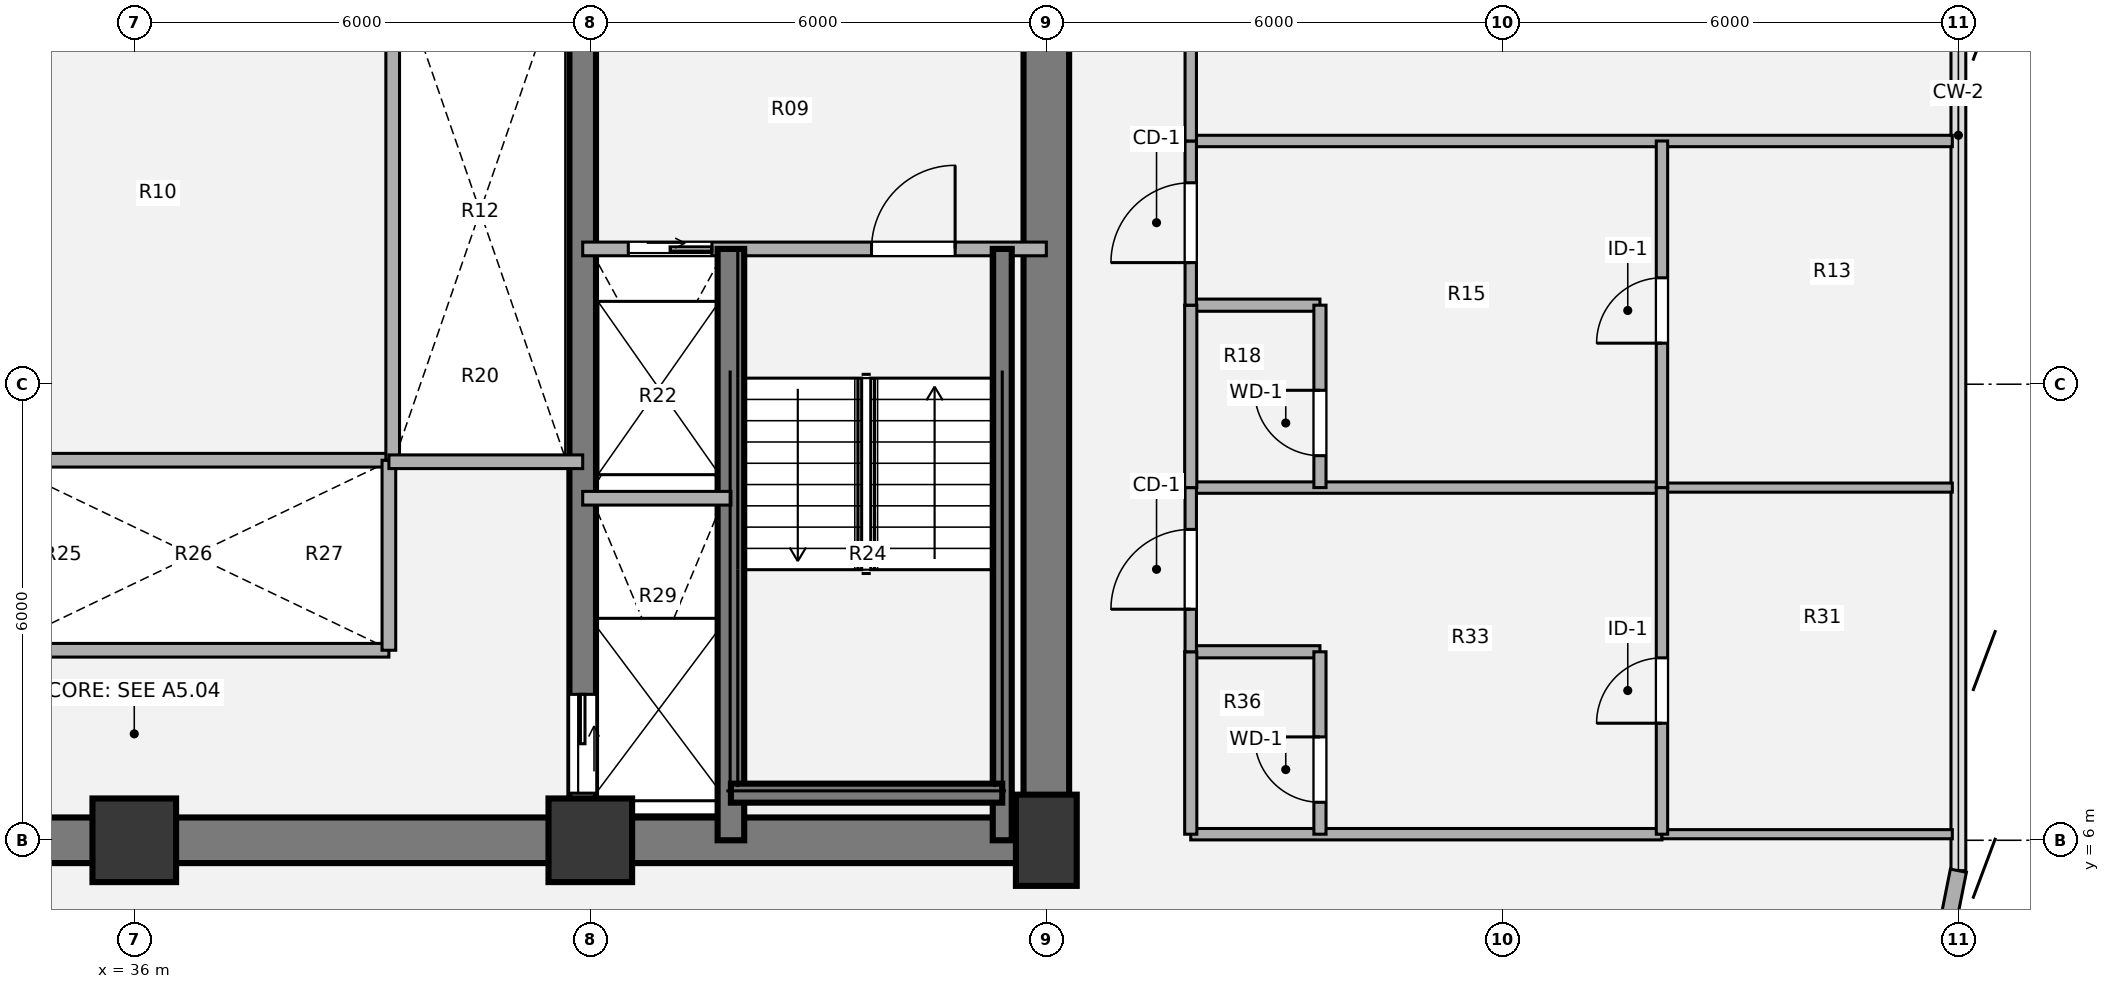
"""IFC4 building model, lengths in metres.
Left out: names, types, materials, properties, quantities, classifications, styles, units other than length and angle.
Written with IfcOpenShell. Run it as: python <this file> out.ifc"""

import sys

from ifc_helpers import new_model, si_unit, direction, frame, frame_2d, origin, origin_2d, place, context, subcontext, project, spatial, rectangle, extrude, source, transform, mapped, element, fill, save


model = new_model("IFC4")
c1 = context("Model", 3, precision=1e-05, world=origin(), true_north=direction((0.0, 1.0)))
c2 = subcontext(c1, "Body", "Model", "MODEL_VIEW")
j1 = project(units=[si_unit("LENGTHUNIT", "METRE"), si_unit("PLANEANGLEUNIT", "RADIAN")], contexts=[c1])
p1 = place(None, origin())
s1 = spatial("IfcSite", under=j1, at=p1, CompositionType="ELEMENT")
p2 = place(p1, origin())
s2 = spatial("IfcBuilding", under=s1, at=p2, CompositionType="ELEMENT")
p3 = place(p2, frame((0.0, 0.0, 49.68)))
s3 = spatial("IfcBuildingStorey", under=s2, at=p3, CompositionType="ELEMENT", Elevation=49.68)
m1 = source(origin(), c2, "Body", "SweptSolid", [
    extrude(rectangle(XDim=1.1, YDim=1.1, at=origin_2d()), origin(), (0.0, 0.0, 1.0), 3.78),
])
for number, where, z_axis, x_axis in (
    (1, (36.0, 6.0, 0.0), (0.0, 0.0, 1.0), (1.0, 0.0, 0.0)),
    (2, (42.0, 6.0, 0.0), (0.0, 0.0, 1.0), (1.0, 0.0, 0.0)),
):
    element("IfcColumn", number, at=place(p3, frame(where, z_axis=z_axis, x_axis=x_axis)), inside=s3, PredefinedType="COLUMN", context=c2, shape_type="MappedRepresentation", body=[
        mapped(m1, transform((0.0, 0.0, 0.0), x_axis=(1.0, 0.0, 0.0), y_axis=(0.0, 1.0, 0.0), z_axis=(0.0, 0.0, 1.0), scale=1.0)),
    ])
m2 = source(origin(), c2, "Body", "SweptSolid", [
    extrude(rectangle(XDim=0.8, YDim=1.2, at=origin_2d()), origin(), (0.0, 0.0, 1.0), 3.78),
])
p4 = place(p3, frame((48.0, 6.0, 0.0), z_axis=(0.0, 0.0, 1.0), x_axis=(1.0, 0.0, 0.0)))
e3 = element("IfcColumn", 3, at=p4, inside=s3, PredefinedType="COLUMN", context=c2, shape_type="MappedRepresentation", body=[
    mapped(m2, transform((0.0, 0.0, 0.0), x_axis=(1.0, 0.0, 0.0), y_axis=(0.0, 1.0, 0.0), z_axis=(0.0, 0.0, 1.0), scale=1.0)),
])
p5 = place(p3, frame((48.3, 6.0, 0.0), z_axis=(0.0, 0.0, 1.0), x_axis=(-1.0, 0.0, 0.0)))
e4 = element("IfcWall", 4, at=p5, inside=s3, PredefinedType="SHEAR", context=c2, shape_type="SweptSolid", body=[
    extrude(rectangle(XDim=24.6, YDim=0.6, at=frame_2d((12.3, 0.0))), origin(), (0.0, 0.0, 1.0), 3.78),
])
p6 = place(p3, frame((48.0, 18.0, 0.0), z_axis=(0.0, 0.0, 1.0), x_axis=(0.0, -1.0, 0.0)))
e5 = element("IfcWall", 5, at=p6, inside=s3, PredefinedType="SHEAR", context=c2, shape_type="SweptSolid", body=[
    extrude(rectangle(XDim=12.0, YDim=0.6, at=frame_2d((6.0, 0.0))), origin(), (0.0, 0.0, 1.0), 3.78),
])
p7 = place(p3, frame((41.9, 18.0, 0.0), z_axis=(0.0, 0.0, 1.0), x_axis=(0.0, -1.0, 0.0)))
e6 = element("IfcWall", 6, at=p7, inside=s3, PredefinedType="SHEAR", context=c2, shape_type="SweptSolid", body=[
    extrude(rectangle(XDim=12.0, YDim=0.35, at=frame_2d((6.0, 0.0))), origin(), (0.0, 0.0, 1.0), 3.78),
])
p8 = place(p7, frame((10.08, 0.0, 0.0)))
e7 = element("IfcOpeningElement", 7, at=p8, cuts=e6, PredefinedType="OPENING", context=c2, shape_type="SweptSolid", body=[
    extrude(rectangle(XDim=1.3, YDim=2.1, at=origin_2d()), frame((0.65, 0.185, 1.05), z_axis=(0.0, -1.0, 0.0), x_axis=(1.0, 0.0, 0.0)), (0.0, 0.0, 1.0), 0.37),
])
p9 = place(p3, frame((60.0, 5.6, 0.0), z_axis=(0.0, 0.0, 1.0), x_axis=(-0.195138390419, -0.980775717779, 0.0)))
e8 = element("IfcWall", 8, at=p9, inside=s3, PredefinedType="SOLIDWALL", context=c2, shape_type="SweptSolid", body=[
    extrude(rectangle(XDim=1.249, YDim=0.215, at=frame_2d((0.624, 0.0))), origin(), (0.0, 0.0, 1.0), 3.53),
])
for number, where, z_axis, x_axis in (
    (9, (34.2, 11.0, 0.0), (0.0, 0.0, 1.0), (1.0, 0.0, 0.0)),
    (10, (34.2, 8.5, 0.0), (0.0, 0.0, 1.0), (1.0, 0.0, 0.0)),
):
    element("IfcWall", number, at=place(p3, frame(where, z_axis=z_axis, x_axis=x_axis)), inside=s3, PredefinedType="PARTITIONING", context=c2, shape_type="SweptSolid", body=[
        extrude(rectangle(XDim=5.15, YDim=0.18, at=frame_2d((2.575, 0.0))), origin(), (0.0, 0.0, 1.0), 3.5),
    ])
p10 = place(p3, frame((39.35, 8.5, 0.0), z_axis=(0.0, 0.0, 1.0), x_axis=(0.0, 1.0, 0.0)))
e11 = element("IfcWall", 11, at=p10, inside=s3, PredefinedType="PARTITIONING", context=c2, shape_type="SweptSolid", body=[
    extrude(rectangle(XDim=2.5, YDim=0.18, at=frame_2d((1.25, 0.0))), origin(), (0.0, 0.0, 1.0), 3.5),
])
p11 = place(p3, frame((39.4, 11.0, 0.0), z_axis=(0.0, 0.0, 1.0), x_axis=(0.0, 1.0, 0.0)))
e12 = element("IfcWall", 12, at=p11, inside=s3, PredefinedType="PARTITIONING", context=c2, shape_type="SweptSolid", body=[
    extrude(rectangle(XDim=7.0, YDim=0.18, at=frame_2d((3.5, 0.0))), origin(), (0.0, 0.0, 1.0), 3.5),
])
p12 = place(p3, frame((39.35, 10.98, 0.0), z_axis=(0.0, 0.0, 1.0), x_axis=(1.0, 0.0, 0.0)))
e13 = element("IfcWall", 13, at=p12, inside=s3, PredefinedType="PARTITIONING", context=c2, shape_type="SweptSolid", body=[
    extrude(rectangle(XDim=2.55, YDim=0.18, at=frame_2d((1.275, 0.0))), origin(), (0.0, 0.0, 1.0), 3.5),
])
p13 = place(p3, frame((41.9, 13.78, 0.0), z_axis=(0.0, 0.0, 1.0), x_axis=(1.0, 0.0, 0.0)))
e14 = element("IfcWall", 14, at=p13, inside=s3, PredefinedType="PARTITIONING", context=c2, shape_type="SweptSolid", body=[
    extrude(rectangle(XDim=6.1, YDim=0.18, at=frame_2d((3.05, 0.0))), origin(), (0.0, 0.0, 1.0), 3.5),
])
p14 = place(p13, frame((0.6, 0.0, 0.0)))
e15 = element("IfcOpeningElement", 15, at=p14, cuts=e14, PredefinedType="OPENING", context=c2, shape_type="SweptSolid", body=[
    extrude(rectangle(XDim=1.1, YDim=2.1, at=origin_2d()), frame((0.55, 0.1, 1.05), z_axis=(0.0, -1.0, 0.0), x_axis=(1.0, 0.0, 0.0)), (0.0, 0.0, 1.0), 0.2),
])
p15 = place(p13, frame((3.8, 0.0, 0.0)))
e16 = element("IfcOpeningElement", 16, at=p15, cuts=e14, PredefinedType="OPENING", context=c2, shape_type="SweptSolid", body=[
    extrude(rectangle(XDim=1.1, YDim=2.1, at=origin_2d()), frame((0.55, 0.1, 1.05), z_axis=(0.0, -1.0, 0.0), x_axis=(1.0, 0.0, 0.0)), (0.0, 0.0, 1.0), 0.2),
])
p16 = place(p3, frame((43.85, 6.0, 0.0), z_axis=(0.0, 0.0, 1.0), x_axis=(0.0, 1.0, 0.0)))
e17 = element("IfcWall", 17, at=p16, inside=s3, PredefinedType="SHEAR", context=c2, shape_type="SweptSolid", body=[
    extrude(rectangle(XDim=7.78, YDim=0.35, at=frame_2d((3.89, 0.0))), origin(), (0.0, 0.0, 1.0), 3.85),
])
p17 = place(p3, frame((47.42, 6.0, 0.0), z_axis=(0.0, 0.0, 1.0), x_axis=(0.0, 1.0, 0.0)))
e18 = element("IfcWall", 18, at=p17, inside=s3, PredefinedType="SHEAR", context=c2, shape_type="SweptSolid", body=[
    extrude(rectangle(XDim=7.78, YDim=0.25, at=frame_2d((3.89, 0.0))), origin(), (0.0, 0.0, 1.0), 3.85),
])
p18 = place(p3, frame((43.85, 6.62, 0.0), z_axis=(0.0, 0.0, 1.0), x_axis=(1.0, 0.0, 0.0)))
e19 = element("IfcWall", 19, at=p18, inside=s3, PredefinedType="SHEAR", context=c2, shape_type="SweptSolid", body=[
    extrude(rectangle(XDim=3.57, YDim=0.25, at=frame_2d((1.785, 0.0))), origin(), (0.0, 0.0, 1.0), 3.85),
])
p19 = place(p3, frame((41.9, 10.5, 0.0), z_axis=(0.0, 0.0, 1.0), x_axis=(1.0, 0.0, 0.0)))
e20 = element("IfcWall", 20, at=p19, inside=s3, PredefinedType="PARTITIONING", context=c2, shape_type="SweptSolid", body=[
    extrude(rectangle(XDim=1.95, YDim=0.18, at=frame_2d((0.975, 0.0))), origin(), (0.0, 0.0, 1.0), 3.5),
])
p20 = place(p3, frame((49.9, 6.08, 0.0), z_axis=(0.0, 0.0, 1.0), x_axis=(1.0, 0.0, 0.0)))
e21 = element("IfcWall", 21, at=p20, inside=s3, PredefinedType="PARTITIONING", context=c2, shape_type="SweptSolid", body=[
    extrude(rectangle(XDim=6.2, YDim=0.15, at=frame_2d((3.1, 0.0))), origin(), (0.0, 0.0, 1.0), 3.5),
])
p21 = place(p3, frame((56.1, 6.08, 0.0), z_axis=(0.0, 0.0, 1.0), x_axis=(1.0, 0.0, 0.0)))
e22 = element("IfcWall", 22, at=p21, inside=s3, PredefinedType="PARTITIONING", context=c2, shape_type="SweptSolid", body=[
    extrude(rectangle(XDim=3.82, YDim=0.12, at=frame_2d((1.91, 0.0))), origin(), (0.0, 0.0, 1.0), 3.5),
])
p22 = place(p3, frame((49.9, 8.48, 0.0), z_axis=(0.0, 0.0, 1.0), x_axis=(1.0, 0.0, 0.0)))
e23 = element("IfcWall", 23, at=p22, inside=s3, PredefinedType="PLUMBINGWALL", context=c2, shape_type="SweptSolid", body=[
    extrude(rectangle(XDim=1.7, YDim=0.16, at=frame_2d((0.85, 0.0))), origin(), (0.0, 0.0, 1.0), 3.5),
])
p23 = place(p3, frame((49.9, 10.64, 0.0), z_axis=(0.0, 0.0, 1.0), x_axis=(1.0, 0.0, 0.0)))
e24 = element("IfcWall", 24, at=p23, inside=s3, PredefinedType="PARTITIONING", context=c2, shape_type="SweptSolid", body=[
    extrude(rectangle(XDim=6.2, YDim=0.15, at=frame_2d((3.1, 0.0))), origin(), (0.0, 0.0, 1.0), 3.5),
])
p24 = place(p3, frame((56.1, 10.64, 0.0), z_axis=(0.0, 0.0, 1.0), x_axis=(1.0, 0.0, 0.0)))
e25 = element("IfcWall", 25, at=p24, inside=s3, PredefinedType="PARTITIONING", context=c2, shape_type="SweptSolid", body=[
    extrude(rectangle(XDim=3.82, YDim=0.12, at=frame_2d((1.91, 0.0))), origin(), (0.0, 0.0, 1.0), 3.5),
])
p25 = place(p3, frame((49.9, 13.04, 0.0), z_axis=(0.0, 0.0, 1.0), x_axis=(1.0, 0.0, 0.0)))
e26 = element("IfcWall", 26, at=p25, inside=s3, PredefinedType="PLUMBINGWALL", context=c2, shape_type="SweptSolid", body=[
    extrude(rectangle(XDim=1.7, YDim=0.16, at=frame_2d((0.85, 0.0))), origin(), (0.0, 0.0, 1.0), 3.5),
])
p26 = place(p3, frame((49.9, 15.2, 0.0), z_axis=(0.0, 0.0, 1.0), x_axis=(1.0, 0.0, 0.0)))
e27 = element("IfcWall", 27, at=p26, inside=s3, PredefinedType="PARTITIONING", context=c2, shape_type="SweptSolid", body=[
    extrude(rectangle(XDim=10.02, YDim=0.15, at=frame_2d((5.01, 0.0))), origin(), (0.0, 0.0, 1.0), 3.5),
])
p27 = place(p3, frame((49.9, 6.08, 0.0), z_axis=(0.0, 0.0, 1.0), x_axis=(0.0, 1.0, 0.0)))
e28 = element("IfcWall", 28, at=p27, inside=s3, PredefinedType="PLUMBINGWALL", context=c2, shape_type="SweptSolid", body=[
    extrude(rectangle(XDim=2.4, YDim=0.16, at=frame_2d((1.2, 0.0))), origin(), (0.0, 0.0, 1.0), 3.5),
])
p28 = place(p3, frame((49.9, 8.48, 0.0), z_axis=(0.0, 0.0, 1.0), x_axis=(0.0, 1.0, 0.0)))
e29 = element("IfcWall", 29, at=p28, inside=s3, PredefinedType="PARTITIONING", context=c2, shape_type="SweptSolid", body=[
    extrude(rectangle(XDim=2.16, YDim=0.15, at=frame_2d((1.08, 0.0))), origin(), (0.0, 0.0, 1.0), 3.5),
])
p29 = place(p28, frame((0.56, 0.0, 0.0)))
e30 = element("IfcOpeningElement", 30, at=p29, cuts=e29, PredefinedType="OPENING", context=c2, shape_type="SweptSolid", body=[
    extrude(rectangle(XDim=1.05, YDim=2.1, at=origin_2d()), frame((0.525, 0.085, 1.05), z_axis=(0.0, -1.0, 0.0), x_axis=(1.0, 0.0, 0.0)), (0.0, 0.0, 1.0), 0.17),
])
p30 = place(p3, frame((49.9, 10.64, 0.0), z_axis=(0.0, 0.0, 1.0), x_axis=(0.0, 1.0, 0.0)))
e31 = element("IfcWall", 31, at=p30, inside=s3, PredefinedType="PLUMBINGWALL", context=c2, shape_type="SweptSolid", body=[
    extrude(rectangle(XDim=2.4, YDim=0.16, at=frame_2d((1.2, 0.0))), origin(), (0.0, 0.0, 1.0), 3.5),
])
p31 = place(p3, frame((49.9, 13.04, 0.0), z_axis=(0.0, 0.0, 1.0), x_axis=(0.0, 1.0, 0.0)))
e32 = element("IfcWall", 32, at=p31, inside=s3, PredefinedType="PARTITIONING", context=c2, shape_type="SweptSolid", body=[
    extrude(rectangle(XDim=2.16, YDim=0.15, at=frame_2d((1.08, 0.0))), origin(), (0.0, 0.0, 1.0), 3.5),
])
p32 = place(p31, frame((0.56, 0.0, 0.0)))
e33 = element("IfcOpeningElement", 33, at=p32, cuts=e32, PredefinedType="OPENING", context=c2, shape_type="SweptSolid", body=[
    extrude(rectangle(XDim=1.05, YDim=2.1, at=origin_2d()), frame((0.525, 0.085, 1.05), z_axis=(0.0, -1.0, 0.0), x_axis=(1.0, 0.0, 0.0)), (0.0, 0.0, 1.0), 0.17),
])
p33 = place(p3, frame((49.9, 15.2, 0.0), z_axis=(0.0, 0.0, 1.0), x_axis=(0.0, 1.0, 0.0)))
e34 = element("IfcWall", 34, at=p33, inside=s3, PredefinedType="PARTITIONING", context=c2, shape_type="SweptSolid", body=[
    extrude(rectangle(XDim=9.8, YDim=0.15, at=frame_2d((4.9, 0.0))), origin(), (0.0, 0.0, 1.0), 3.5),
])
p34 = place(p33, frame((4.375, 0.0, 0.0)))
e35 = element("IfcOpeningElement", 35, at=p34, cuts=e34, PredefinedType="OPENING", context=c2, shape_type="SweptSolid", body=[
    extrude(rectangle(XDim=1.05, YDim=2.1, at=origin_2d()), frame((0.525, 0.085, 1.05), z_axis=(0.0, -1.0, 0.0), x_axis=(1.0, 0.0, 0.0)), (0.0, 0.0, 1.0), 0.17),
])
p35 = place(p3, frame((51.6, 6.08, 0.0), z_axis=(0.0, 0.0, 1.0), x_axis=(0.0, 1.0, 0.0)))
e36 = element("IfcWall", 36, at=p35, inside=s3, PredefinedType="PLUMBINGWALL", context=c2, shape_type="SweptSolid", body=[
    extrude(rectangle(XDim=2.4, YDim=0.16, at=frame_2d((1.2, 0.0))), origin(), (0.0, 0.0, 1.0), 3.5),
])
p36 = place(p35, frame((0.42, 0.0, 0.0)))
e37 = element("IfcOpeningElement", 37, at=p36, cuts=e36, PredefinedType="OPENING", context=c2, shape_type="SweptSolid", body=[
    extrude(rectangle(XDim=0.86, YDim=2.1, at=origin_2d()), frame((0.43, 0.09, 1.05), z_axis=(0.0, -1.0, 0.0), x_axis=(1.0, 0.0, 0.0)), (0.0, 0.0, 1.0), 0.18),
])
p37 = place(p3, frame((51.6, 10.64, 0.0), z_axis=(0.0, 0.0, 1.0), x_axis=(0.0, 1.0, 0.0)))
e38 = element("IfcWall", 38, at=p37, inside=s3, PredefinedType="PLUMBINGWALL", context=c2, shape_type="SweptSolid", body=[
    extrude(rectangle(XDim=2.4, YDim=0.16, at=frame_2d((1.2, 0.0))), origin(), (0.0, 0.0, 1.0), 3.5),
])
p38 = place(p37, frame((0.42, 0.0, 0.0)))
e39 = element("IfcOpeningElement", 39, at=p38, cuts=e38, PredefinedType="OPENING", context=c2, shape_type="SweptSolid", body=[
    extrude(rectangle(XDim=0.86, YDim=2.1, at=origin_2d()), frame((0.43, 0.09, 1.05), z_axis=(0.0, -1.0, 0.0), x_axis=(1.0, 0.0, 0.0)), (0.0, 0.0, 1.0), 0.18),
])
p39 = place(p3, frame((56.1, 6.08, 0.0), z_axis=(0.0, 0.0, 1.0), x_axis=(0.0, 1.0, 0.0)))
e40 = element("IfcWall", 40, at=p39, inside=s3, PredefinedType="PARTITIONING", context=c2, shape_type="SweptSolid", body=[
    extrude(rectangle(XDim=4.56, YDim=0.15, at=frame_2d((2.28, 0.0))), origin(), (0.0, 0.0, 1.0), 3.5),
])
p40 = place(p39, frame((1.46, 0.0, 0.0)))
e41 = element("IfcOpeningElement", 41, at=p40, cuts=e40, PredefinedType="OPENING", context=c2, shape_type="SweptSolid", body=[
    extrude(rectangle(XDim=0.86, YDim=2.1, at=origin_2d()), frame((0.43, 0.085, 1.05), z_axis=(0.0, -1.0, 0.0), x_axis=(1.0, 0.0, 0.0)), (0.0, 0.0, 1.0), 0.17),
])
p41 = place(p3, frame((56.1, 10.64, 0.0), z_axis=(0.0, 0.0, 1.0), x_axis=(0.0, 1.0, 0.0)))
e42 = element("IfcWall", 42, at=p41, inside=s3, PredefinedType="PARTITIONING", context=c2, shape_type="SweptSolid", body=[
    extrude(rectangle(XDim=4.56, YDim=0.15, at=frame_2d((2.28, 0.0))), origin(), (0.0, 0.0, 1.0), 3.5),
])
p42 = place(p41, frame((1.9, 0.0, 0.0)))
e43 = element("IfcOpeningElement", 43, at=p42, cuts=e42, PredefinedType="OPENING", context=c2, shape_type="SweptSolid", body=[
    extrude(rectangle(XDim=0.86, YDim=2.1, at=origin_2d()), frame((0.43, 0.085, 1.05), z_axis=(0.0, -1.0, 0.0), x_axis=(1.0, 0.0, 0.0)), (0.0, 0.0, 1.0), 0.17),
])
m3 = source(origin(), c2, "Body", "SweptSolid", [
    extrude(rectangle(XDim=1.1, YDim=2.1, at=origin_2d()), frame((0.55, 0.025, 1.05), z_axis=(0.0, -1.0, 0.0), x_axis=(1.0, 0.0, 0.0)), (0.0, 0.0, 1.0), 0.05),
])
p43 = place(p14, origin())
e44 = element("IfcDoor", 44, at=p43, inside=s3, OperationType="SLIDING_TO_RIGHT", PredefinedType="DOOR", context=c2, shape_type="MappedRepresentation", body=[
    mapped(m3, transform((0.0, 0.0, 0.0), x_axis=(1.0, 0.0, 0.0), y_axis=(0.0, 1.0, 0.0), z_axis=(0.0, 0.0, 1.0), scale=1.0)),
])
fill(e15, e44)
m4 = source(origin(), c2, "Body", "SweptSolid", [
    extrude(rectangle(XDim=1.1, YDim=2.1, at=origin_2d()), frame((0.55, 0.025, 1.05), z_axis=(0.0, -1.0, 0.0), x_axis=(1.0, 0.0, 0.0)), (0.0, 0.0, 1.0), 0.05),
])
p44 = place(p15, origin())
e45 = element("IfcDoor", 45, at=p44, inside=s3, OperationType="SINGLE_SWING_RIGHT", PredefinedType="DOOR", context=c2, shape_type="MappedRepresentation", body=[
    mapped(m4, transform((0.0, 0.0, 0.0), x_axis=(1.0, 0.0, 0.0), y_axis=(0.0, 1.0, 0.0), z_axis=(0.0, 0.0, 1.0), scale=1.0)),
])
fill(e16, e45)
m5 = source(origin(), c2, "Body", "SweptSolid", [
    extrude(rectangle(XDim=1.3, YDim=2.1, at=origin_2d()), frame((0.65, 0.025, 1.05), z_axis=(0.0, -1.0, 0.0), x_axis=(1.0, 0.0, 0.0)), (0.0, 0.0, 1.0), 0.05),
])
p45 = place(p8, origin())
e46 = element("IfcDoor", 46, at=p45, inside=s3, OperationType="SLIDING_TO_LEFT", PredefinedType="DOOR", context=c2, shape_type="MappedRepresentation", body=[
    mapped(m5, transform((0.0, 0.0, 0.0), x_axis=(1.0, 0.0, 0.0), y_axis=(0.0, 1.0, 0.0), z_axis=(0.0, 0.0, 1.0), scale=1.0)),
])
fill(e7, e46)
m6 = source(origin(), c2, "Body", "SweptSolid", [
    extrude(rectangle(XDim=1.05, YDim=2.1, at=origin_2d()), frame((0.525, 0.025, 1.05), z_axis=(0.0, -1.0, 0.0), x_axis=(1.0, 0.0, 0.0)), (0.0, 0.0, 1.0), 0.05),
])
p46 = place(p29, origin())
e47 = element("IfcDoor", 47, at=p46, inside=s3, OperationType="SINGLE_SWING_LEFT", PredefinedType="DOOR", context=c2, shape_type="MappedRepresentation", body=[
    mapped(m6, transform((0.0, 0.0, 0.0), x_axis=(1.0, 0.0, 0.0), y_axis=(0.0, 1.0, 0.0), z_axis=(0.0, 0.0, 1.0), scale=1.0)),
])
fill(e30, e47)
p47 = place(p32, origin())
e48 = element("IfcDoor", 48, at=p47, inside=s3, OperationType="SINGLE_SWING_LEFT", PredefinedType="DOOR", context=c2, shape_type="MappedRepresentation", body=[
    mapped(m6, transform((0.0, 0.0, 0.0), x_axis=(1.0, 0.0, 0.0), y_axis=(0.0, 1.0, 0.0), z_axis=(0.0, 0.0, 1.0), scale=1.0)),
])
fill(e33, e48)
m7 = source(origin(), c2, "Body", "SweptSolid", [
    extrude(rectangle(XDim=0.86, YDim=2.1, at=origin_2d()), frame((0.43, 0.025, 1.05), z_axis=(0.0, -1.0, 0.0), x_axis=(1.0, 0.0, 0.0)), (0.0, 0.0, 1.0), 0.05),
])
p48 = place(p36, origin())
e49 = element("IfcDoor", 49, at=p48, inside=s3, OperationType="SINGLE_SWING_RIGHT", PredefinedType="DOOR", context=c2, shape_type="MappedRepresentation", body=[
    mapped(m7, transform((0.0, 0.0, 0.0), x_axis=(1.0, 0.0, 0.0), y_axis=(0.0, 1.0, 0.0), z_axis=(0.0, 0.0, 1.0), scale=1.0)),
])
fill(e37, e49)
p49 = place(p38, origin())
e50 = element("IfcDoor", 50, at=p49, inside=s3, OperationType="SINGLE_SWING_RIGHT", PredefinedType="DOOR", context=c2, shape_type="MappedRepresentation", body=[
    mapped(m7, transform((0.0, 0.0, 0.0), x_axis=(1.0, 0.0, 0.0), y_axis=(0.0, 1.0, 0.0), z_axis=(0.0, 0.0, 1.0), scale=1.0)),
])
fill(e39, e50)
m8 = source(origin(), c2, "Body", "SweptSolid", [
    extrude(rectangle(XDim=0.86, YDim=2.1, at=origin_2d()), frame((0.43, 0.025, 1.05), z_axis=(0.0, -1.0, 0.0), x_axis=(1.0, 0.0, 0.0)), (0.0, 0.0, 1.0), 0.05),
])
p50 = place(p40, origin())
e51 = element("IfcDoor", 51, at=p50, inside=s3, OperationType="SINGLE_SWING_LEFT", PredefinedType="DOOR", context=c2, shape_type="MappedRepresentation", body=[
    mapped(m8, transform((0.0, 0.0, 0.0), x_axis=(1.0, 0.0, 0.0), y_axis=(0.0, 1.0, 0.0), z_axis=(0.0, 0.0, 1.0), scale=1.0)),
])
fill(e41, e51)
p51 = place(p42, origin())
e52 = element("IfcDoor", 52, at=p51, inside=s3, OperationType="SINGLE_SWING_LEFT", PredefinedType="DOOR", context=c2, shape_type="MappedRepresentation", body=[
    mapped(m8, transform((0.0, 0.0, 0.0), x_axis=(1.0, 0.0, 0.0), y_axis=(0.0, 1.0, 0.0), z_axis=(0.0, 0.0, 1.0), scale=1.0)),
])
fill(e43, e52)
save(model, sys.argv[1])
